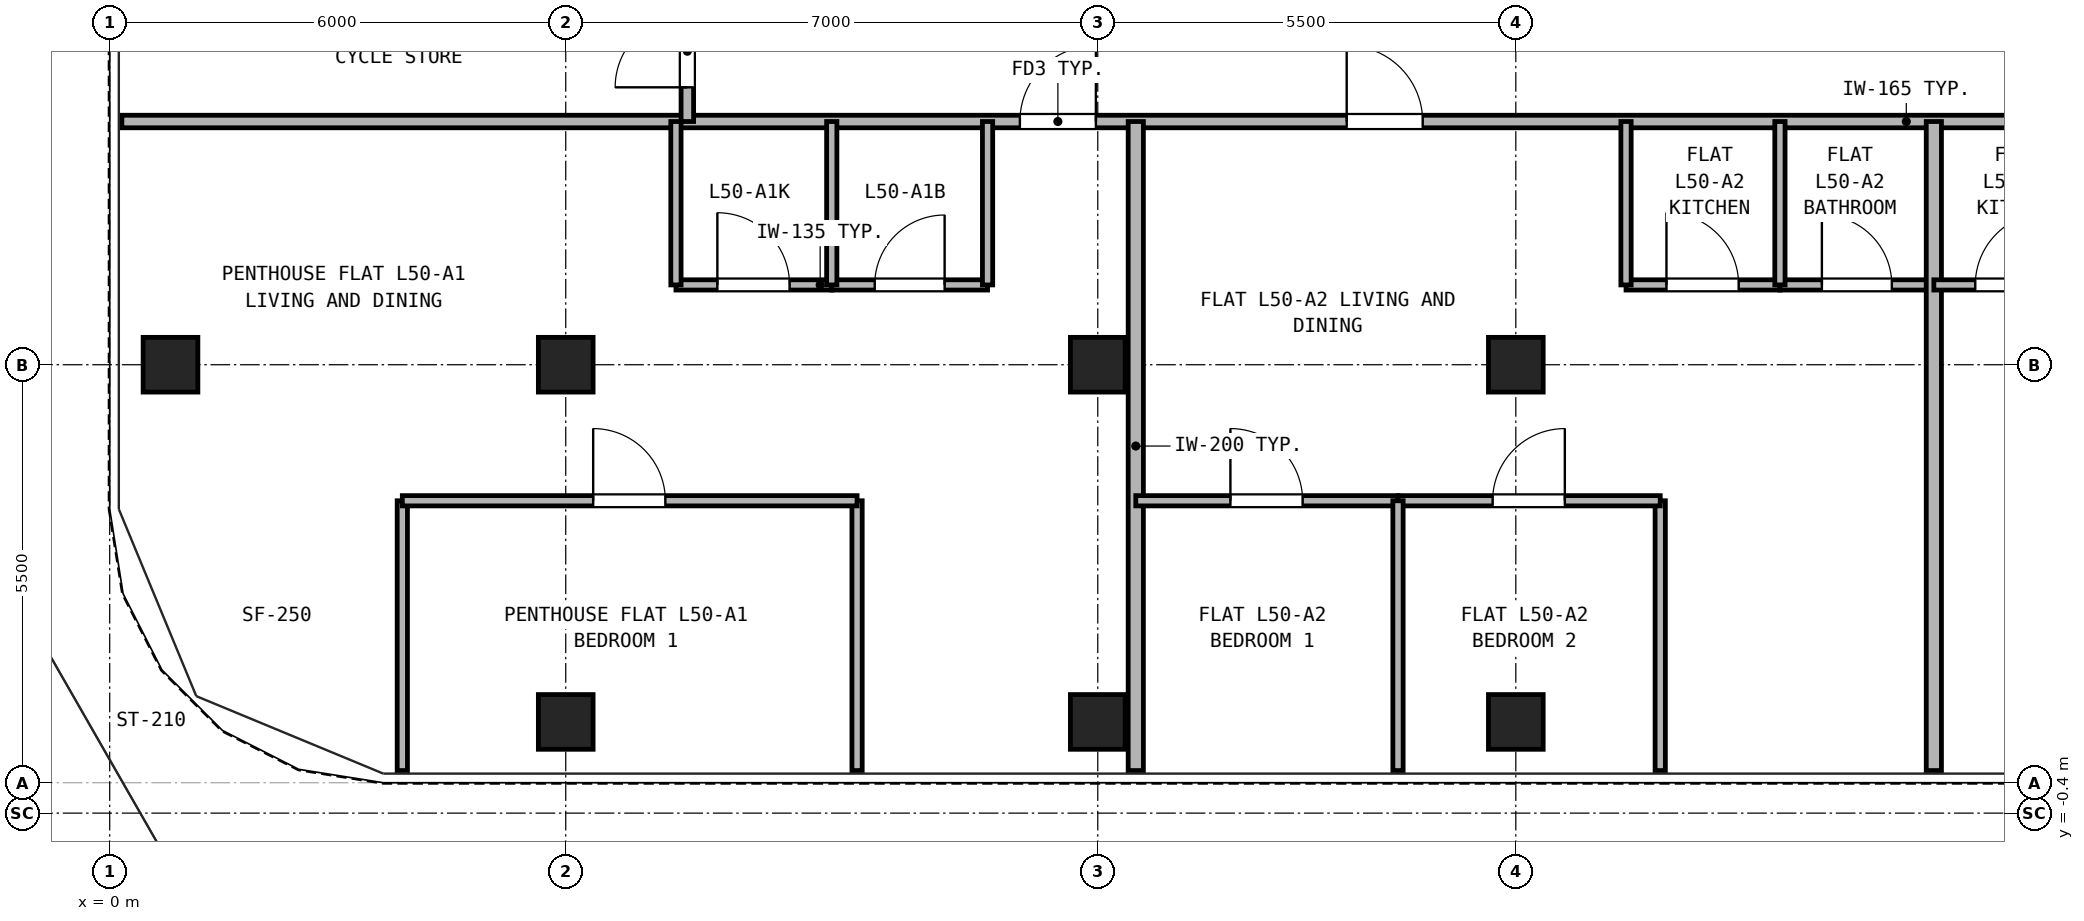
"""IFC4 building model, lengths in metres.
Left out: names, types, materials, properties, quantities, classifications, styles, units other than length and angle.
Written with IfcOpenShell. Run it as: python <this file> out.ifc"""

import sys

from ifc_helpers import new_model, si_unit, direction, frame, frame_2d, origin, origin_2d, place, context, subcontext, project, spatial, rectangle, hollow_rectangle, extrude, source, transform, mapped, element, fill, save


model = new_model("IFC4")
c1 = context("Model", 3, precision=1e-05, world=origin(), true_north=direction((0.0, 1.0)))
c2 = subcontext(c1, "Body", "Model", "MODEL_VIEW")
j1 = project(units=[si_unit("LENGTHUNIT", "METRE"), si_unit("PLANEANGLEUNIT", "RADIAN")], contexts=[c1])
p1 = place(None, origin())
s1 = spatial("IfcSite", under=j1, at=p1, CompositionType="ELEMENT")
p2 = place(p1, origin())
s2 = spatial("IfcBuilding", under=s1, at=p2, CompositionType="ELEMENT")
p3 = place(p2, frame((0.0, 0.0, 178.5)))
s3 = spatial("IfcBuildingStorey", under=s2, at=p3, CompositionType="ELEMENT", Elevation=178.5)
m1 = source(origin(), c2, "Body", "SweptSolid", [
    extrude(hollow_rectangle(XDim=0.72, YDim=0.72, WallThickness=0.04, at=origin_2d()), origin(), (0.0, 0.0, 1.0), 2.95),
])
for number, where, z_axis, x_axis in (
    (1, (6.0, 0.8, 0.0), (0.0, 0.0, 1.0), (1.0, 0.0, 0.0)),
    (2, (13.0, 0.8, 0.0), (0.0, 0.0, 1.0), (1.0, 0.0, 0.0)),
    (3, (18.5, 0.8, 0.0), (0.0, 0.0, 1.0), (1.0, 0.0, 0.0)),
    (4, (0.8, 5.5, 0.0), (0.0, 0.0, 1.0), (1.0, 0.0, 0.0)),
    (5, (6.0, 5.5, 0.0), (0.0, 0.0, 1.0), (1.0, 0.0, 0.0)),
    (6, (13.0, 5.5, 0.0), (0.0, 0.0, 1.0), (1.0, 0.0, 0.0)),
    (7, (18.5, 5.5, 0.0), (0.0, 0.0, 1.0), (1.0, 0.0, 0.0)),
):
    element("IfcColumn", number, at=place(p3, frame(where, z_axis=z_axis, x_axis=x_axis)), inside=s3, PredefinedType="COLUMN", context=c2, shape_type="MappedRepresentation", body=[
        mapped(m1, transform((0.0, 0.0, 0.0), x_axis=(1.0, 0.0, 0.0), y_axis=(0.0, 1.0, 0.0), z_axis=(0.0, 0.0, 1.0), scale=1.0)),
    ])
p4 = place(p3, frame((0.16, 8.7, 0.0), z_axis=(0.0, 0.0, 1.0), x_axis=(1.0, 0.0, 0.0)))
e8 = element("IfcWall", 8, at=p4, inside=s3, PredefinedType="PARTITIONING", context=c2, shape_type="SweptSolid", body=[
    extrude(rectangle(XDim=41.48, YDim=0.165, at=frame_2d((20.74, 0.0))), origin(), (0.0, 0.0, 1.0), 2.583),
])
p5 = place(p4, frame((11.815, 0.0, 0.0)))
e9 = element("IfcOpeningElement", 9, at=p5, cuts=e8, PredefinedType="OPENING", context=c2, shape_type="SweptSolid", body=[
    extrude(rectangle(XDim=1.0, YDim=2.15, at=frame_2d((0.5, 1.075))), frame((0.0, 0.093, 0.0), z_axis=(0.0, -1.0, 0.0), x_axis=(1.0, 0.0, 0.0)), (0.0, 0.0, 1.0), 0.185),
])
p6 = place(p4, frame((16.115, 0.0, 0.0)))
e10 = element("IfcOpeningElement", 10, at=p6, cuts=e8, PredefinedType="OPENING", context=c2, shape_type="SweptSolid", body=[
    extrude(rectangle(XDim=1.0, YDim=2.15, at=frame_2d((0.5, 1.075))), frame((0.0, 0.093, 0.0), z_axis=(0.0, -1.0, 0.0), x_axis=(1.0, 0.0, 0.0)), (0.0, 0.0, 1.0), 0.185),
])
p7 = place(p4, frame((29.84, 0.0, 0.0)))
e11 = element("IfcOpeningElement", 11, at=p7, cuts=e8, PredefinedType="OPENING", context=c2, shape_type="SweptSolid", body=[
    extrude(rectangle(XDim=1.0, YDim=2.15, at=frame_2d((0.5, 1.075))), frame((0.0, 0.093, 0.0), z_axis=(0.0, -1.0, 0.0), x_axis=(1.0, 0.0, 0.0)), (0.0, 0.0, 1.0), 0.185),
])
p8 = place(p4, frame((33.615, 0.0, 0.0)))
e12 = element("IfcOpeningElement", 12, at=p8, cuts=e8, PredefinedType="OPENING", context=c2, shape_type="SweptSolid", body=[
    extrude(rectangle(XDim=1.0, YDim=2.15, at=frame_2d((0.5, 1.075))), frame((0.0, 0.093, 0.0), z_axis=(0.0, -1.0, 0.0), x_axis=(1.0, 0.0, 0.0)), (0.0, 0.0, 1.0), 0.185),
])
p9 = place(p3, frame((7.6, 8.7, 0.0), z_axis=(0.0, 0.0, 1.0), x_axis=(0.0, 1.0, 0.0)))
e13 = element("IfcWall", 13, at=p9, inside=s3, PredefinedType="PARTITIONING", context=c2, shape_type="SweptSolid", body=[
    extrude(rectangle(XDim=2.0, YDim=0.165, at=frame_2d((1.0, 0.0))), origin(), (0.0, 0.0, 1.0), 2.95),
])
p10 = place(p9, frame((0.45, 0.0, 0.0)))
e14 = element("IfcOpeningElement", 14, at=p10, cuts=e13, PredefinedType="OPENING", context=c2, shape_type="SweptSolid", body=[
    extrude(rectangle(XDim=0.95, YDim=2.15, at=frame_2d((0.475, 1.075))), frame((0.0, 0.093, 0.0), z_axis=(0.0, -1.0, 0.0), x_axis=(1.0, 0.0, 0.0)), (0.0, 0.0, 1.0), 0.185),
])
p11 = place(p3, frame((7.45, 6.55, 0.0), z_axis=(0.0, 0.0, 1.0), x_axis=(1.0, 0.0, 0.0)))
e15 = element("IfcWall", 15, at=p11, inside=s3, PredefinedType="PARTITIONING", context=c2, shape_type="SweptSolid", body=[
    extrude(rectangle(XDim=2.05, YDim=0.135, at=frame_2d((1.025, 0.0))), origin(), (0.0, 0.0, 1.0), 2.95),
])
p12 = place(p11, frame((0.545, 0.0, 0.0)))
e16 = element("IfcOpeningElement", 16, at=p12, cuts=e15, PredefinedType="OPENING", context=c2, shape_type="SweptSolid", body=[
    extrude(rectangle(XDim=0.95, YDim=2.15, at=frame_2d((0.475, 1.075))), frame((0.0, 0.077, 0.0), z_axis=(0.0, -1.0, 0.0), x_axis=(1.0, 0.0, 0.0)), (0.0, 0.0, 1.0), 0.155),
])
p13 = place(p3, frame((9.5, 6.55, 0.0), z_axis=(0.0, 0.0, 1.0), x_axis=(1.0, 0.0, 0.0)))
e17 = element("IfcWall", 17, at=p13, inside=s3, PredefinedType="PARTITIONING", context=c2, shape_type="SweptSolid", body=[
    extrude(rectangle(XDim=2.05, YDim=0.135, at=frame_2d((1.025, 0.0))), origin(), (0.0, 0.0, 1.0), 2.95),
])
p14 = place(p13, frame((0.565, 0.0, 0.0)))
e18 = element("IfcOpeningElement", 18, at=p14, cuts=e17, PredefinedType="OPENING", context=c2, shape_type="SweptSolid", body=[
    extrude(rectangle(XDim=0.92, YDim=2.1, at=frame_2d((0.46, 1.05))), frame((0.0, 0.077, 0.0), z_axis=(0.0, -1.0, 0.0), x_axis=(1.0, 0.0, 0.0)), (0.0, 0.0, 1.0), 0.155),
])
for number, where, z_axis, x_axis in (
    (19, (7.45, 6.55, 0.0), (0.0, 0.0, 1.0), (0.0, 1.0, 0.0)),
    (20, (9.5, 6.55, 0.0), (0.0, 0.0, 1.0), (0.0, 1.0, 0.0)),
    (21, (11.55, 6.55, 0.0), (0.0, 0.0, 1.0), (0.0, 1.0, 0.0)),
):
    element("IfcWall", number, at=place(p3, frame(where, z_axis=z_axis, x_axis=x_axis)), inside=s3, PredefinedType="PARTITIONING", context=c2, shape_type="SweptSolid", body=[
        extrude(rectangle(XDim=2.15, YDim=0.135, at=frame_2d((1.075, 0.0))), origin(), (0.0, 0.0, 1.0), 2.95),
    ])
for number, where, z_axis, x_axis in (
    (22, (3.85, 0.16, 0.0), (0.0, 0.0, 1.0), (0.0, 1.0, 0.0)),
    (23, (9.833, 0.16, 0.0), (0.0, 0.0, 1.0), (0.0, 1.0, 0.0)),
):
    element("IfcWall", number, at=place(p3, frame(where, z_axis=z_axis, x_axis=x_axis)), inside=s3, PredefinedType="PARTITIONING", context=c2, shape_type="SweptSolid", body=[
        extrude(rectangle(XDim=3.55, YDim=0.135, at=frame_2d((1.775, 0.0))), origin(), (0.0, 0.0, 1.0), 2.95),
    ])
p15 = place(p3, frame((3.85, 3.71, 0.0), z_axis=(0.0, 0.0, 1.0), x_axis=(1.0, 0.0, 0.0)))
e24 = element("IfcWall", 24, at=p15, inside=s3, PredefinedType="PARTITIONING", context=c2, shape_type="SweptSolid", body=[
    extrude(rectangle(XDim=5.983, YDim=0.135, at=frame_2d((2.991, 0.0))), origin(), (0.0, 0.0, 1.0), 2.95),
])
p16 = place(p15, frame((2.511, 0.0, 0.0)))
e25 = element("IfcOpeningElement", 25, at=p16, cuts=e24, PredefinedType="OPENING", context=c2, shape_type="SweptSolid", body=[
    extrude(rectangle(XDim=0.95, YDim=2.15, at=frame_2d((0.475, 1.075))), frame((0.0, 0.077, 0.0), z_axis=(0.0, -1.0, 0.0), x_axis=(1.0, 0.0, 0.0)), (0.0, 0.0, 1.0), 0.155),
])
p17 = place(p3, frame((13.5, 0.16, 0.0), z_axis=(0.0, 0.0, 1.0), x_axis=(0.0, 1.0, 0.0)))
e26 = element("IfcWall", 26, at=p17, inside=s3, PredefinedType="PARTITIONING", context=c2, shape_type="SweptSolid", body=[
    extrude(rectangle(XDim=8.54, YDim=0.2, at=frame_2d((4.27, 0.0))), origin(), (0.0, 0.0, 1.0), 2.95),
])
p18 = place(p3, frame((19.95, 6.55, 0.0), z_axis=(0.0, 0.0, 1.0), x_axis=(1.0, 0.0, 0.0)))
e27 = element("IfcWall", 27, at=p18, inside=s3, PredefinedType="PARTITIONING", context=c2, shape_type="SweptSolid", body=[
    extrude(rectangle(XDim=2.025, YDim=0.135, at=frame_2d((1.013, 0.0))), origin(), (0.0, 0.0, 1.0), 2.95),
])
p19 = place(p18, frame((0.532, 0.0, 0.0)))
e28 = element("IfcOpeningElement", 28, at=p19, cuts=e27, PredefinedType="OPENING", context=c2, shape_type="SweptSolid", body=[
    extrude(rectangle(XDim=0.95, YDim=2.15, at=frame_2d((0.475, 1.075))), frame((0.0, 0.077, 0.0), z_axis=(0.0, -1.0, 0.0), x_axis=(1.0, 0.0, 0.0)), (0.0, 0.0, 1.0), 0.155),
])
p20 = place(p3, frame((21.975, 6.55, 0.0), z_axis=(0.0, 0.0, 1.0), x_axis=(1.0, 0.0, 0.0)))
e29 = element("IfcWall", 29, at=p20, inside=s3, PredefinedType="PARTITIONING", context=c2, shape_type="SweptSolid", body=[
    extrude(rectangle(XDim=2.025, YDim=0.135, at=frame_2d((1.012, 0.0))), origin(), (0.0, 0.0, 1.0), 2.95),
])
p21 = place(p20, frame((0.552, 0.0, 0.0)))
e30 = element("IfcOpeningElement", 30, at=p21, cuts=e29, PredefinedType="OPENING", context=c2, shape_type="SweptSolid", body=[
    extrude(rectangle(XDim=0.92, YDim=2.1, at=frame_2d((0.46, 1.05))), frame((0.0, 0.077, 0.0), z_axis=(0.0, -1.0, 0.0), x_axis=(1.0, 0.0, 0.0)), (0.0, 0.0, 1.0), 0.155),
])
for number, where, z_axis, x_axis in (
    (31, (19.95, 6.55, 0.0), (0.0, 0.0, 1.0), (0.0, 1.0, 0.0)),
    (32, (21.975, 6.55, 0.0), (0.0, 0.0, 1.0), (0.0, 1.0, 0.0)),
):
    element("IfcWall", number, at=place(p3, frame(where, z_axis=z_axis, x_axis=x_axis)), inside=s3, PredefinedType="PARTITIONING", context=c2, shape_type="SweptSolid", body=[
        extrude(rectangle(XDim=2.15, YDim=0.135, at=frame_2d((1.075, 0.0))), origin(), (0.0, 0.0, 1.0), 2.95),
    ])
p22 = place(p3, frame((20.4, 0.16, 0.0), z_axis=(0.0, 0.0, 1.0), x_axis=(0.0, 1.0, 0.0)))
e33 = element("IfcWall", 33, at=p22, inside=s3, PredefinedType="PARTITIONING", context=c2, shape_type="SweptSolid", body=[
    extrude(rectangle(XDim=3.55, YDim=0.135, at=frame_2d((1.775, 0.0))), origin(), (0.0, 0.0, 1.0), 2.95),
])
p23 = place(p3, frame((13.5, 3.71, 0.0), z_axis=(0.0, 0.0, 1.0), x_axis=(1.0, 0.0, 0.0)))
e34 = element("IfcWall", 34, at=p23, inside=s3, PredefinedType="PARTITIONING", context=c2, shape_type="SweptSolid", body=[
    extrude(rectangle(XDim=3.45, YDim=0.135, at=frame_2d((1.725, 0.0))), origin(), (0.0, 0.0, 1.0), 2.95),
])
p24 = place(p23, frame((1.245, 0.0, 0.0)))
e35 = element("IfcOpeningElement", 35, at=p24, cuts=e34, PredefinedType="OPENING", context=c2, shape_type="SweptSolid", body=[
    extrude(rectangle(XDim=0.95, YDim=2.15, at=frame_2d((0.475, 1.075))), frame((0.0, 0.077, 0.0), z_axis=(0.0, -1.0, 0.0), x_axis=(1.0, 0.0, 0.0)), (0.0, 0.0, 1.0), 0.155),
])
p25 = place(p3, frame((16.95, 3.71, 0.0), z_axis=(0.0, 0.0, 1.0), x_axis=(1.0, 0.0, 0.0)))
e36 = element("IfcWall", 36, at=p25, inside=s3, PredefinedType="PARTITIONING", context=c2, shape_type="SweptSolid", body=[
    extrude(rectangle(XDim=3.45, YDim=0.135, at=frame_2d((1.725, 0.0))), origin(), (0.0, 0.0, 1.0), 2.95),
])
p26 = place(p25, frame((1.245, 0.0, 0.0)))
e37 = element("IfcOpeningElement", 37, at=p26, cuts=e36, PredefinedType="OPENING", context=c2, shape_type="SweptSolid", body=[
    extrude(rectangle(XDim=0.95, YDim=2.15, at=frame_2d((0.475, 1.075))), frame((0.0, 0.077, 0.0), z_axis=(0.0, -1.0, 0.0), x_axis=(1.0, 0.0, 0.0)), (0.0, 0.0, 1.0), 0.155),
])
p27 = place(p3, frame((16.95, 0.16, 0.0), z_axis=(0.0, 0.0, 1.0), x_axis=(0.0, 1.0, 0.0)))
e38 = element("IfcWall", 38, at=p27, inside=s3, PredefinedType="PARTITIONING", context=c2, shape_type="SweptSolid", body=[
    extrude(rectangle(XDim=3.55, YDim=0.135, at=frame_2d((1.775, 0.0))), origin(), (0.0, 0.0, 1.0), 2.95),
])
p28 = place(p3, frame((24.0, 0.16, 0.0), z_axis=(0.0, 0.0, 1.0), x_axis=(0.0, 1.0, 0.0)))
e39 = element("IfcWall", 39, at=p28, inside=s3, PredefinedType="PARTITIONING", context=c2, shape_type="SweptSolid", body=[
    extrude(rectangle(XDim=8.54, YDim=0.2, at=frame_2d((4.27, 0.0))), origin(), (0.0, 0.0, 1.0), 2.95),
])
p29 = place(p3, frame((24.0, 6.55, 0.0), z_axis=(0.0, 0.0, 1.0), x_axis=(1.0, 0.0, 0.0)))
e40 = element("IfcWall", 40, at=p29, inside=s3, PredefinedType="PARTITIONING", context=c2, shape_type="SweptSolid", body=[
    extrude(rectangle(XDim=2.05, YDim=0.135, at=frame_2d((1.025, 0.0))), origin(), (0.0, 0.0, 1.0), 2.95),
])
p30 = place(p29, frame((0.545, 0.0, 0.0)))
e41 = element("IfcOpeningElement", 41, at=p30, cuts=e40, PredefinedType="OPENING", context=c2, shape_type="SweptSolid", body=[
    extrude(rectangle(XDim=0.95, YDim=2.15, at=frame_2d((0.475, 1.075))), frame((0.0, 0.077, 0.0), z_axis=(0.0, -1.0, 0.0), x_axis=(1.0, 0.0, 0.0)), (0.0, 0.0, 1.0), 0.155),
])
p31 = place(p12, origin())
e42 = element("IfcDoor", 42, at=p31, inside=s3, OperationType="SINGLE_SWING_LEFT", PredefinedType="DOOR", context=c2, shape_type="SweptSolid", body=[
    extrude(rectangle(XDim=0.95, YDim=2.15, at=frame_2d((0.475, 1.075))), frame((0.0, 0.025, 0.0), z_axis=(0.0, -1.0, 0.0), x_axis=(1.0, 0.0, 0.0)), (0.0, 0.0, 1.0), 0.05),
])
fill(e16, e42)
p32 = place(p14, origin())
e43 = element("IfcDoor", 43, at=p32, inside=s3, OperationType="SINGLE_SWING_RIGHT", PredefinedType="DOOR", context=c2, shape_type="SweptSolid", body=[
    extrude(rectangle(XDim=0.92, YDim=2.1, at=frame_2d((0.46, 1.05))), frame((0.0, 0.025, 0.0), z_axis=(0.0, -1.0, 0.0), x_axis=(1.0, 0.0, 0.0)), (0.0, 0.0, 1.0), 0.05),
])
fill(e18, e43)
p33 = place(p16, frame((0.95, 0.0, 0.0), z_axis=(0.0, 0.0, 1.0), x_axis=(-1.0, 0.0, 0.0)))
e44 = element("IfcDoor", 44, at=p33, inside=s3, OperationType="SINGLE_SWING_LEFT", PredefinedType="DOOR", context=c2, shape_type="SweptSolid", body=[
    extrude(rectangle(XDim=0.95, YDim=2.15, at=frame_2d((0.475, 1.075))), frame((0.0, 0.025, 0.0), z_axis=(0.0, -1.0, 0.0), x_axis=(1.0, 0.0, 0.0)), (0.0, 0.0, 1.0), 0.05),
])
fill(e25, e44)
p34 = place(p5, frame((1.0, 0.0, 0.0), z_axis=(0.0, 0.0, 1.0), x_axis=(-1.0, 0.0, 0.0)))
e45 = element("IfcDoor", 45, at=p34, inside=s3, OperationType="SINGLE_SWING_RIGHT", PredefinedType="DOOR", context=c2, shape_type="SweptSolid", body=[
    extrude(rectangle(XDim=1.0, YDim=2.15, at=frame_2d((0.5, 1.075))), frame((0.0, 0.025, 0.0), z_axis=(0.0, -1.0, 0.0), x_axis=(1.0, 0.0, 0.0)), (0.0, 0.0, 1.0), 0.05),
])
fill(e9, e45)
p35 = place(p19, origin())
e46 = element("IfcDoor", 46, at=p35, inside=s3, OperationType="SINGLE_SWING_LEFT", PredefinedType="DOOR", context=c2, shape_type="SweptSolid", body=[
    extrude(rectangle(XDim=0.95, YDim=2.15, at=frame_2d((0.475, 1.075))), frame((0.0, 0.025, 0.0), z_axis=(0.0, -1.0, 0.0), x_axis=(1.0, 0.0, 0.0)), (0.0, 0.0, 1.0), 0.05),
])
fill(e28, e46)
p36 = place(p21, origin())
e47 = element("IfcDoor", 47, at=p36, inside=s3, OperationType="SINGLE_SWING_LEFT", PredefinedType="DOOR", context=c2, shape_type="SweptSolid", body=[
    extrude(rectangle(XDim=0.92, YDim=2.1, at=frame_2d((0.46, 1.05))), frame((0.0, 0.025, 0.0), z_axis=(0.0, -1.0, 0.0), x_axis=(1.0, 0.0, 0.0)), (0.0, 0.0, 1.0), 0.05),
])
fill(e30, e47)
p37 = place(p24, frame((0.95, 0.0, 0.0), z_axis=(0.0, 0.0, 1.0), x_axis=(-1.0, 0.0, 0.0)))
e48 = element("IfcDoor", 48, at=p37, inside=s3, OperationType="SINGLE_SWING_LEFT", PredefinedType="DOOR", context=c2, shape_type="SweptSolid", body=[
    extrude(rectangle(XDim=0.95, YDim=2.15, at=frame_2d((0.475, 1.075))), frame((0.0, 0.025, 0.0), z_axis=(0.0, -1.0, 0.0), x_axis=(1.0, 0.0, 0.0)), (0.0, 0.0, 1.0), 0.05),
])
fill(e35, e48)
p38 = place(p26, frame((0.95, 0.0, 0.0), z_axis=(0.0, 0.0, 1.0), x_axis=(-1.0, 0.0, 0.0)))
e49 = element("IfcDoor", 49, at=p38, inside=s3, OperationType="SINGLE_SWING_RIGHT", PredefinedType="DOOR", context=c2, shape_type="SweptSolid", body=[
    extrude(rectangle(XDim=0.95, YDim=2.15, at=frame_2d((0.475, 1.075))), frame((0.0, 0.025, 0.0), z_axis=(0.0, -1.0, 0.0), x_axis=(1.0, 0.0, 0.0)), (0.0, 0.0, 1.0), 0.05),
])
fill(e37, e49)
p39 = place(p6, frame((1.0, 0.0, 0.0), z_axis=(0.0, 0.0, 1.0), x_axis=(-1.0, 0.0, 0.0)))
e50 = element("IfcDoor", 50, at=p39, inside=s3, OperationType="SINGLE_SWING_LEFT", PredefinedType="DOOR", context=c2, shape_type="SweptSolid", body=[
    extrude(rectangle(XDim=1.0, YDim=2.15, at=frame_2d((0.5, 1.075))), frame((0.0, 0.025, 0.0), z_axis=(0.0, -1.0, 0.0), x_axis=(1.0, 0.0, 0.0)), (0.0, 0.0, 1.0), 0.05),
])
fill(e10, e50)
p40 = place(p30, origin())
e51 = element("IfcDoor", 51, at=p40, inside=s3, OperationType="SINGLE_SWING_RIGHT", PredefinedType="DOOR", context=c2, shape_type="SweptSolid", body=[
    extrude(rectangle(XDim=0.95, YDim=2.15, at=frame_2d((0.475, 1.075))), frame((0.0, 0.025, 0.0), z_axis=(0.0, -1.0, 0.0), x_axis=(1.0, 0.0, 0.0)), (0.0, 0.0, 1.0), 0.05),
])
fill(e41, e51)
p41 = place(p10, frame((0.95, 0.0, 0.0), z_axis=(0.0, 0.0, 1.0), x_axis=(-1.0, 0.0, 0.0)))
e52 = element("IfcDoor", 52, at=p41, inside=s3, OperationType="SINGLE_SWING_LEFT", PredefinedType="DOOR", context=c2, shape_type="SweptSolid", body=[
    extrude(rectangle(XDim=0.95, YDim=2.15, at=frame_2d((0.475, 1.075))), frame((0.0, 0.025, 0.0), z_axis=(0.0, -1.0, 0.0), x_axis=(1.0, 0.0, 0.0)), (0.0, 0.0, 1.0), 0.05),
])
fill(e14, e52)
save(model, sys.argv[1])
